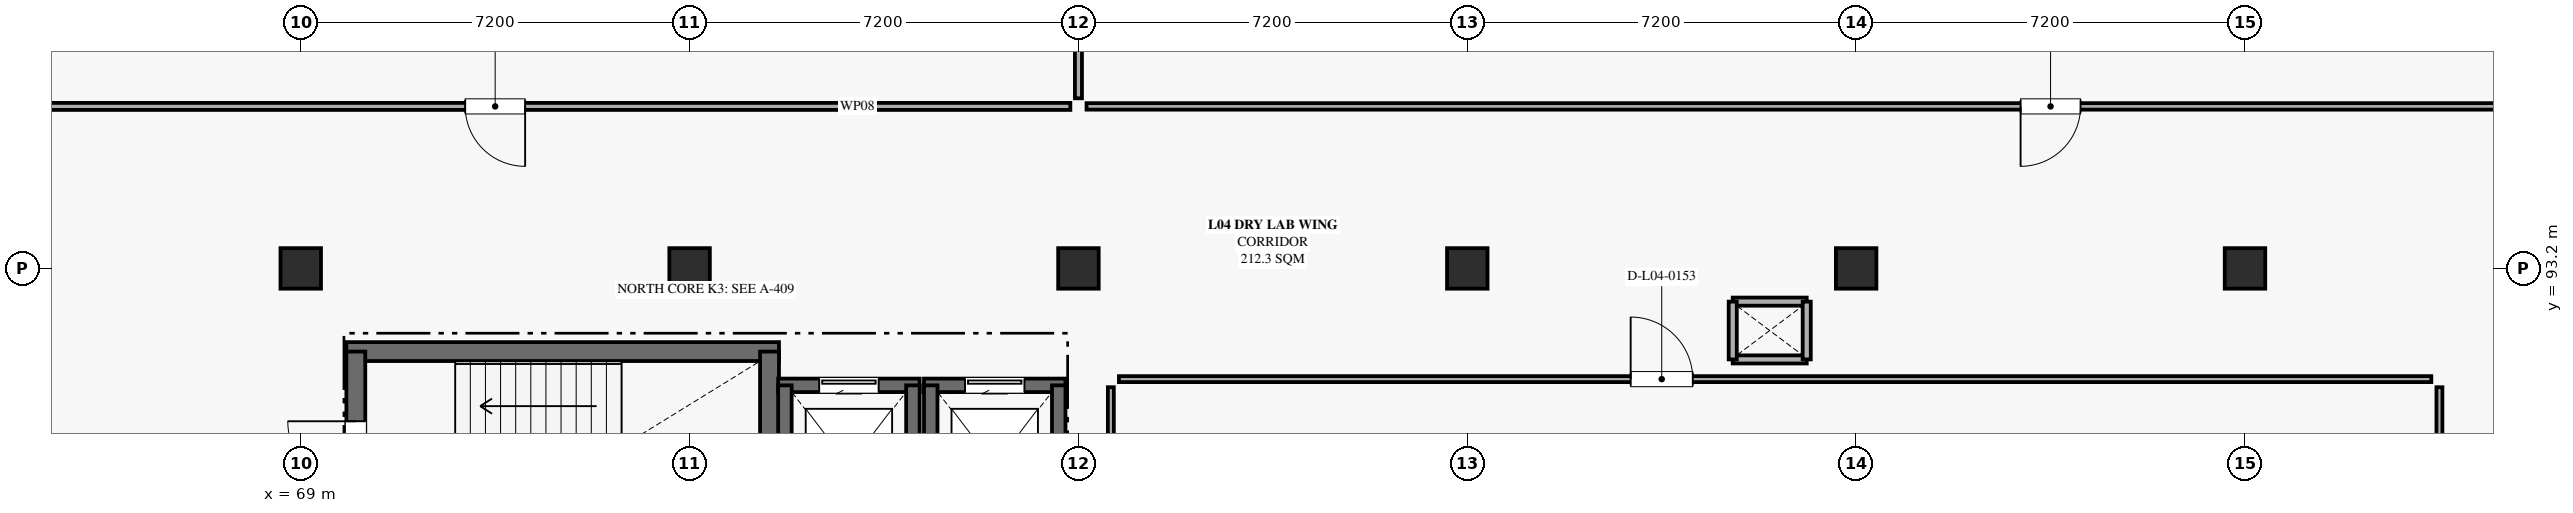
"""IFC4 building model, lengths in metres.
Left out: names, types, materials, properties, quantities, classifications, styles, units other than length and angle.
Written with IfcOpenShell. Run it as: python <this file> out.ifc"""

import sys

from ifc_helpers import new_model, si_unit, direction, frame, frame_2d, origin, origin_2d, place, context, subcontext, project, spatial, rectangle, extrude, element, fill, save


model = new_model("IFC4")
c1 = context("Model", 3, precision=1e-05, world=origin(), true_north=direction((0.0, 1.0)))
c2 = subcontext(c1, "Body", "Model", "MODEL_VIEW")
j1 = project(units=[si_unit("LENGTHUNIT", "METRE"), si_unit("PLANEANGLEUNIT", "RADIAN")], contexts=[c1])
p1 = place(None, origin())
s1 = spatial("IfcSite", under=j1, at=p1, CompositionType="ELEMENT")
p2 = place(p1, origin())
s2 = spatial("IfcBuilding", under=s1, at=p2, CompositionType="ELEMENT")
p3 = place(p2, frame((0.0, 0.0, 19.8)))
s3 = spatial("IfcBuildingStorey", under=s2, at=p3, CompositionType="ELEMENT", Elevation=19.8)
for number, where, z_axis, x_axis in (
    (1, (69.0, 93.2, 0.0), (0.0, 0.0, 1.0), (1.0, 0.0, 0.0)),
    (2, (76.2, 93.2, 0.0), (0.0, 0.0, 1.0), (1.0, 0.0, 0.0)),
    (3, (83.4, 93.2, 0.0), (0.0, 0.0, 1.0), (1.0, 0.0, 0.0)),
    (4, (90.6, 93.2, 0.0), (0.0, 0.0, 1.0), (1.0, 0.0, 0.0)),
    (5, (97.8, 93.2, 0.0), (0.0, 0.0, 1.0), (1.0, 0.0, 0.0)),
    (6, (105.0, 93.2, 0.0), (0.0, 0.0, 1.0), (1.0, 0.0, 0.0)),
):
    element("IfcColumn", number, at=place(p3, frame(where, z_axis=z_axis, x_axis=x_axis)), inside=s3, PredefinedType="COLUMN", context=c2, shape_type="SweptSolid", body=[
        extrude(rectangle(XDim=0.75, YDim=0.75, at=origin_2d()), origin(), (0.0, 0.0, 1.0), 4.5),
    ])
p4 = place(p3, frame((69.845, 91.66, 0.0), z_axis=(0.0, 0.0, 1.0), x_axis=(1.0, 0.0, 0.0)))
e7 = element("IfcWall", 7, at=p4, inside=s3, PredefinedType="SHEAR", context=c2, shape_type="SweptSolid", body=[
    extrude(rectangle(XDim=8.01, YDim=0.35, at=frame_2d((4.005, 0.0))), origin(), (0.0, 0.0, 1.0), 4.23),
])
p5 = place(p3, frame((70.02, 87.82, 0.0), z_axis=(0.0, 0.0, 1.0), x_axis=(0.0, 1.0, 0.0)))
e8 = element("IfcWall", 8, at=p5, inside=s3, PredefinedType="SHEAR", context=c2, shape_type="SweptSolid", body=[
    extrude(rectangle(XDim=3.84, YDim=0.35, at=frame_2d((1.92, 0.0))), origin(), (0.0, 0.0, 1.0), 4.23),
])
p6 = place(p5, frame((1.29, 0.0, 0.0)))
e9 = element("IfcOpeningElement", 9, at=p6, cuts=e8, PredefinedType="OPENING", context=c2, shape_type="SweptSolid", body=[
    extrude(rectangle(XDim=1.26, YDim=2.12, at=frame_2d((0.63, 1.06))), frame((0.0, 0.185, 0.0), z_axis=(0.0, -1.0, 0.0), x_axis=(1.0, 0.0, 0.0)), (0.0, 0.0, 1.0), 0.37),
])
p7 = place(p3, frame((77.68, 91.66, 0.0), z_axis=(0.0, 0.0, 1.0), x_axis=(0.0, -1.0, 0.0)))
e10 = element("IfcWall", 10, at=p7, inside=s3, PredefinedType="SHEAR", context=c2, shape_type="SweptSolid", body=[
    extrude(rectangle(XDim=3.84, YDim=0.35, at=frame_2d((1.92, 0.0))), origin(), (0.0, 0.0, 1.0), 4.23),
])
for number, where, z_axis, x_axis in (
    (11, (96.885, 91.515, 0.0), (0.0, 0.0, 1.0), (-1.0, 0.0, 0.0)),
    (12, (95.515, 92.585, 0.0), (0.0, 0.0, 1.0), (1.0, 0.0, 0.0)),
):
    element("IfcWall", number, at=place(p3, frame(where, z_axis=z_axis, x_axis=x_axis)), inside=s3, PredefinedType="PARTITIONING", context=c2, shape_type="SweptSolid", body=[
        extrude(rectangle(XDim=1.37, YDim=0.15, at=frame_2d((0.685, 0.0))), origin(), (0.0, 0.0, 1.0), 2.98),
    ])
for number, where, z_axis, x_axis in (
    (13, (95.515, 91.515, 0.0), (0.0, 0.0, 1.0), (0.0, 1.0, 0.0)),
    (14, (96.885, 92.585, 0.0), (0.0, 0.0, 1.0), (0.0, -1.0, 0.0)),
):
    element("IfcWall", number, at=place(p3, frame(where, z_axis=z_axis, x_axis=x_axis)), inside=s3, PredefinedType="PARTITIONING", context=c2, shape_type="SweptSolid", body=[
        extrude(rectangle(XDim=1.07, YDim=0.15, at=frame_2d((0.535, 0.0))), origin(), (0.0, 0.0, 1.0), 2.98),
    ])
p8 = place(p3, frame((77.84, 91.035, 0.0), z_axis=(0.0, 0.0, 1.0), x_axis=(1.0, 0.0, 0.0)))
e15 = element("IfcWall", 15, at=p8, inside=s3, PredefinedType="SHEAR", context=c2, shape_type="SweptSolid", body=[
    extrude(rectangle(XDim=2.62, YDim=0.25, at=frame_2d((1.31, 0.0))), origin(), (0.0, 0.0, 1.0), 4.23),
])
p9 = place(p8, frame((0.76, 0.0, 0.0)))
e16 = element("IfcOpeningElement", 16, at=p9, cuts=e15, PredefinedType="OPENING", context=c2, shape_type="SweptSolid", body=[
    extrude(rectangle(XDim=1.1, YDim=2.2, at=frame_2d((0.55, 1.1))), frame((0.0, 0.135, 0.0), z_axis=(0.0, -1.0, 0.0), x_axis=(1.0, 0.0, 0.0)), (0.0, 0.0, 1.0), 0.27),
])
for number, where, z_axis, x_axis in (
    (17, (77.965, 88.065, 0.0), (0.0, 0.0, 1.0), (0.0, 1.0, 0.0)),
    (18, (80.335, 91.035, 0.0), (0.0, 0.0, 1.0), (0.0, -1.0, 0.0)),
):
    element("IfcWall", number, at=place(p3, frame(where, z_axis=z_axis, x_axis=x_axis)), inside=s3, PredefinedType="SHEAR", context=c2, shape_type="SweptSolid", body=[
        extrude(rectangle(XDim=2.97, YDim=0.25, at=frame_2d((1.485, 0.0))), origin(), (0.0, 0.0, 1.0), 4.23),
    ])
p10 = place(p3, frame((80.54, 91.035, 0.0), z_axis=(0.0, 0.0, 1.0), x_axis=(1.0, 0.0, 0.0)))
e19 = element("IfcWall", 19, at=p10, inside=s3, PredefinedType="SHEAR", context=c2, shape_type="SweptSolid", body=[
    extrude(rectangle(XDim=2.62, YDim=0.25, at=frame_2d((1.31, 0.0))), origin(), (0.0, 0.0, 1.0), 4.23),
])
p11 = place(p10, frame((0.76, 0.0, 0.0)))
e20 = element("IfcOpeningElement", 20, at=p11, cuts=e19, PredefinedType="OPENING", context=c2, shape_type="SweptSolid", body=[
    extrude(rectangle(XDim=1.1, YDim=2.2, at=frame_2d((0.55, 1.1))), frame((0.0, 0.135, 0.0), z_axis=(0.0, -1.0, 0.0), x_axis=(1.0, 0.0, 0.0)), (0.0, 0.0, 1.0), 0.27),
])
for number, where, z_axis, x_axis in (
    (21, (80.665, 88.065, 0.0), (0.0, 0.0, 1.0), (0.0, 1.0, 0.0)),
    (22, (83.035, 91.035, 0.0), (0.0, 0.0, 1.0), (0.0, -1.0, 0.0)),
):
    element("IfcWall", number, at=place(p3, frame(where, z_axis=z_axis, x_axis=x_axis)), inside=s3, PredefinedType="SHEAR", context=c2, shape_type="SweptSolid", body=[
        extrude(rectangle(XDim=2.97, YDim=0.25, at=frame_2d((1.485, 0.0))), origin(), (0.0, 0.0, 1.0), 4.23),
    ])
p12 = place(p3, frame((83.25, 96.2, 0.0), z_axis=(0.0, 0.0, 1.0), x_axis=(-1.0, 0.0, 0.0)))
e23 = element("IfcWall", 23, at=p12, inside=s3, PredefinedType="PARTITIONING", context=c2, shape_type="SweptSolid", body=[
    extrude(rectangle(XDim=21.1, YDim=0.13, at=frame_2d((10.55, 0.0))), origin(), (0.0, 0.0, 1.0), 2.98),
])
p13 = place(p12, frame((10.095, 0.0, 0.0)))
e24 = element("IfcOpeningElement", 24, at=p13, cuts=e23, PredefinedType="OPENING", context=c2, shape_type="SweptSolid", body=[
    extrude(rectangle(XDim=1.11, YDim=2.16, at=frame_2d((0.555, 1.08))), frame((0.0, 0.075, 0.0), z_axis=(0.0, -1.0, 0.0), x_axis=(1.0, 0.0, 0.0)), (0.0, 0.0, 1.0), 0.15),
])
p14 = place(p3, frame((83.4, 114.2, 0.0), z_axis=(0.0, 0.0, 1.0), x_axis=(0.0, -1.0, 0.0)))
e25 = element("IfcWall", 25, at=p14, inside=s3, PredefinedType="PARTITIONING", context=c2, shape_type="SweptSolid", body=[
    extrude(rectangle(XDim=17.85, YDim=0.13, at=frame_2d((8.925, 0.0))), origin(), (0.0, 0.0, 1.0), 2.98),
])
p15 = place(p3, frame((111.85, 96.2, 0.0), z_axis=(0.0, 0.0, 1.0), x_axis=(-1.0, 0.0, 0.0)))
e26 = element("IfcWall", 26, at=p15, inside=s3, PredefinedType="PARTITIONING", context=c2, shape_type="SweptSolid", body=[
    extrude(rectangle(XDim=28.3, YDim=0.12, at=frame_2d((14.15, 0.0))), origin(), (0.0, 0.0, 1.0), 2.98),
])
p16 = place(p15, frame((9.895, 0.0, 0.0)))
e27 = element("IfcOpeningElement", 27, at=p16, cuts=e26, PredefinedType="OPENING", context=c2, shape_type="SweptSolid", body=[
    extrude(rectangle(XDim=1.11, YDim=2.22, at=frame_2d((0.555, 1.11))), frame((0.0, 0.07, 0.0), z_axis=(0.0, -1.0, 0.0), x_axis=(1.0, 0.0, 0.0)), (0.0, 0.0, 1.0), 0.14),
])
p17 = place(p3, frame((84.15, 91.15, 0.0), z_axis=(0.0, 0.0, 1.0), x_axis=(1.0, 0.0, 0.0)))
e28 = element("IfcWall", 28, at=p17, inside=s3, PredefinedType="PARTITIONING", context=c2, shape_type="SweptSolid", body=[
    extrude(rectangle(XDim=24.3, YDim=0.11, at=frame_2d((12.15, 0.0))), origin(), (0.0, 0.0, 1.0), 2.98),
])
p18 = place(p17, frame((9.475, 0.0, 0.0)))
e29 = element("IfcOpeningElement", 29, at=p18, cuts=e28, PredefinedType="OPENING", context=c2, shape_type="SweptSolid", body=[
    extrude(rectangle(XDim=1.15, YDim=2.05, at=frame_2d((0.575, 1.025))), frame((0.0, 0.065, 0.0), z_axis=(0.0, -1.0, 0.0), x_axis=(1.0, 0.0, 0.0)), (0.0, 0.0, 1.0), 0.13),
])
for number, where, z_axis, x_axis in (
    (30, (84.0, 86.35, 0.0), (0.0, 0.0, 1.0), (0.0, 1.0, 0.0)),
    (31, (108.6, 91.0, 0.0), (0.0, 0.0, 1.0), (0.0, -1.0, 0.0)),
):
    element("IfcWall", number, at=place(p3, frame(where, z_axis=z_axis, x_axis=x_axis)), inside=s3, PredefinedType="PARTITIONING", context=c2, shape_type="SweptSolid", body=[
        extrude(rectangle(XDim=4.65, YDim=0.11, at=frame_2d((2.325, 0.0))), origin(), (0.0, 0.0, 1.0), 2.98),
    ])
p19 = place(p6, origin())
e32 = element("IfcDoor", 32, at=p19, inside=s3, OperationType="SINGLE_SWING_RIGHT", PredefinedType="DOOR", context=c2, shape_type="SweptSolid", body=[
    extrude(rectangle(XDim=1.26, YDim=2.12, at=frame_2d((0.63, 1.06))), frame((0.0, 0.025, 0.0), z_axis=(0.0, -1.0, 0.0), x_axis=(1.0, 0.0, 0.0)), (0.0, 0.0, 1.0), 0.05),
])
fill(e9, e32)
p20 = place(p9, origin())
e33 = element("IfcDoor", 33, at=p20, inside=s3, OperationType="SLIDING_TO_LEFT", PredefinedType="DOOR", context=c2, shape_type="SweptSolid", body=[
    extrude(rectangle(XDim=1.1, YDim=2.2, at=frame_2d((0.55, 1.1))), frame((0.0, 0.025, 0.0), z_axis=(0.0, -1.0, 0.0), x_axis=(1.0, 0.0, 0.0)), (0.0, 0.0, 1.0), 0.05),
])
fill(e16, e33)
p21 = place(p11, origin())
e34 = element("IfcDoor", 34, at=p21, inside=s3, OperationType="SLIDING_TO_LEFT", PredefinedType="DOOR", context=c2, shape_type="SweptSolid", body=[
    extrude(rectangle(XDim=1.1, YDim=2.2, at=frame_2d((0.55, 1.1))), frame((0.0, 0.025, 0.0), z_axis=(0.0, -1.0, 0.0), x_axis=(1.0, 0.0, 0.0)), (0.0, 0.0, 1.0), 0.05),
])
fill(e20, e34)
p22 = place(p13, origin())
e35 = element("IfcDoor", 35, at=p22, inside=s3, OperationType="SINGLE_SWING_LEFT", PredefinedType="DOOR", context=c2, shape_type="SweptSolid", body=[
    extrude(rectangle(XDim=1.11, YDim=2.16, at=frame_2d((0.555, 1.08))), frame((0.0, 0.025, 0.0), z_axis=(0.0, -1.0, 0.0), x_axis=(1.0, 0.0, 0.0)), (0.0, 0.0, 1.0), 0.05),
])
fill(e24, e35)
p23 = place(p16, origin())
e36 = element("IfcDoor", 36, at=p23, inside=s3, OperationType="SINGLE_SWING_RIGHT", PredefinedType="DOOR", context=c2, shape_type="SweptSolid", body=[
    extrude(rectangle(XDim=1.11, YDim=2.22, at=frame_2d((0.555, 1.11))), frame((0.0, 0.025, 0.0), z_axis=(0.0, -1.0, 0.0), x_axis=(1.0, 0.0, 0.0)), (0.0, 0.0, 1.0), 0.05),
])
fill(e27, e36)
p24 = place(p18, origin())
e37 = element("IfcDoor", 37, at=p24, inside=s3, OperationType="SINGLE_SWING_LEFT", PredefinedType="DOOR", context=c2, shape_type="SweptSolid", body=[
    extrude(rectangle(XDim=1.15, YDim=2.05, at=frame_2d((0.575, 1.025))), frame((0.0, 0.025, 0.0), z_axis=(0.0, -1.0, 0.0), x_axis=(1.0, 0.0, 0.0)), (0.0, 0.0, 1.0), 0.05),
])
fill(e29, e37)
save(model, sys.argv[1])
